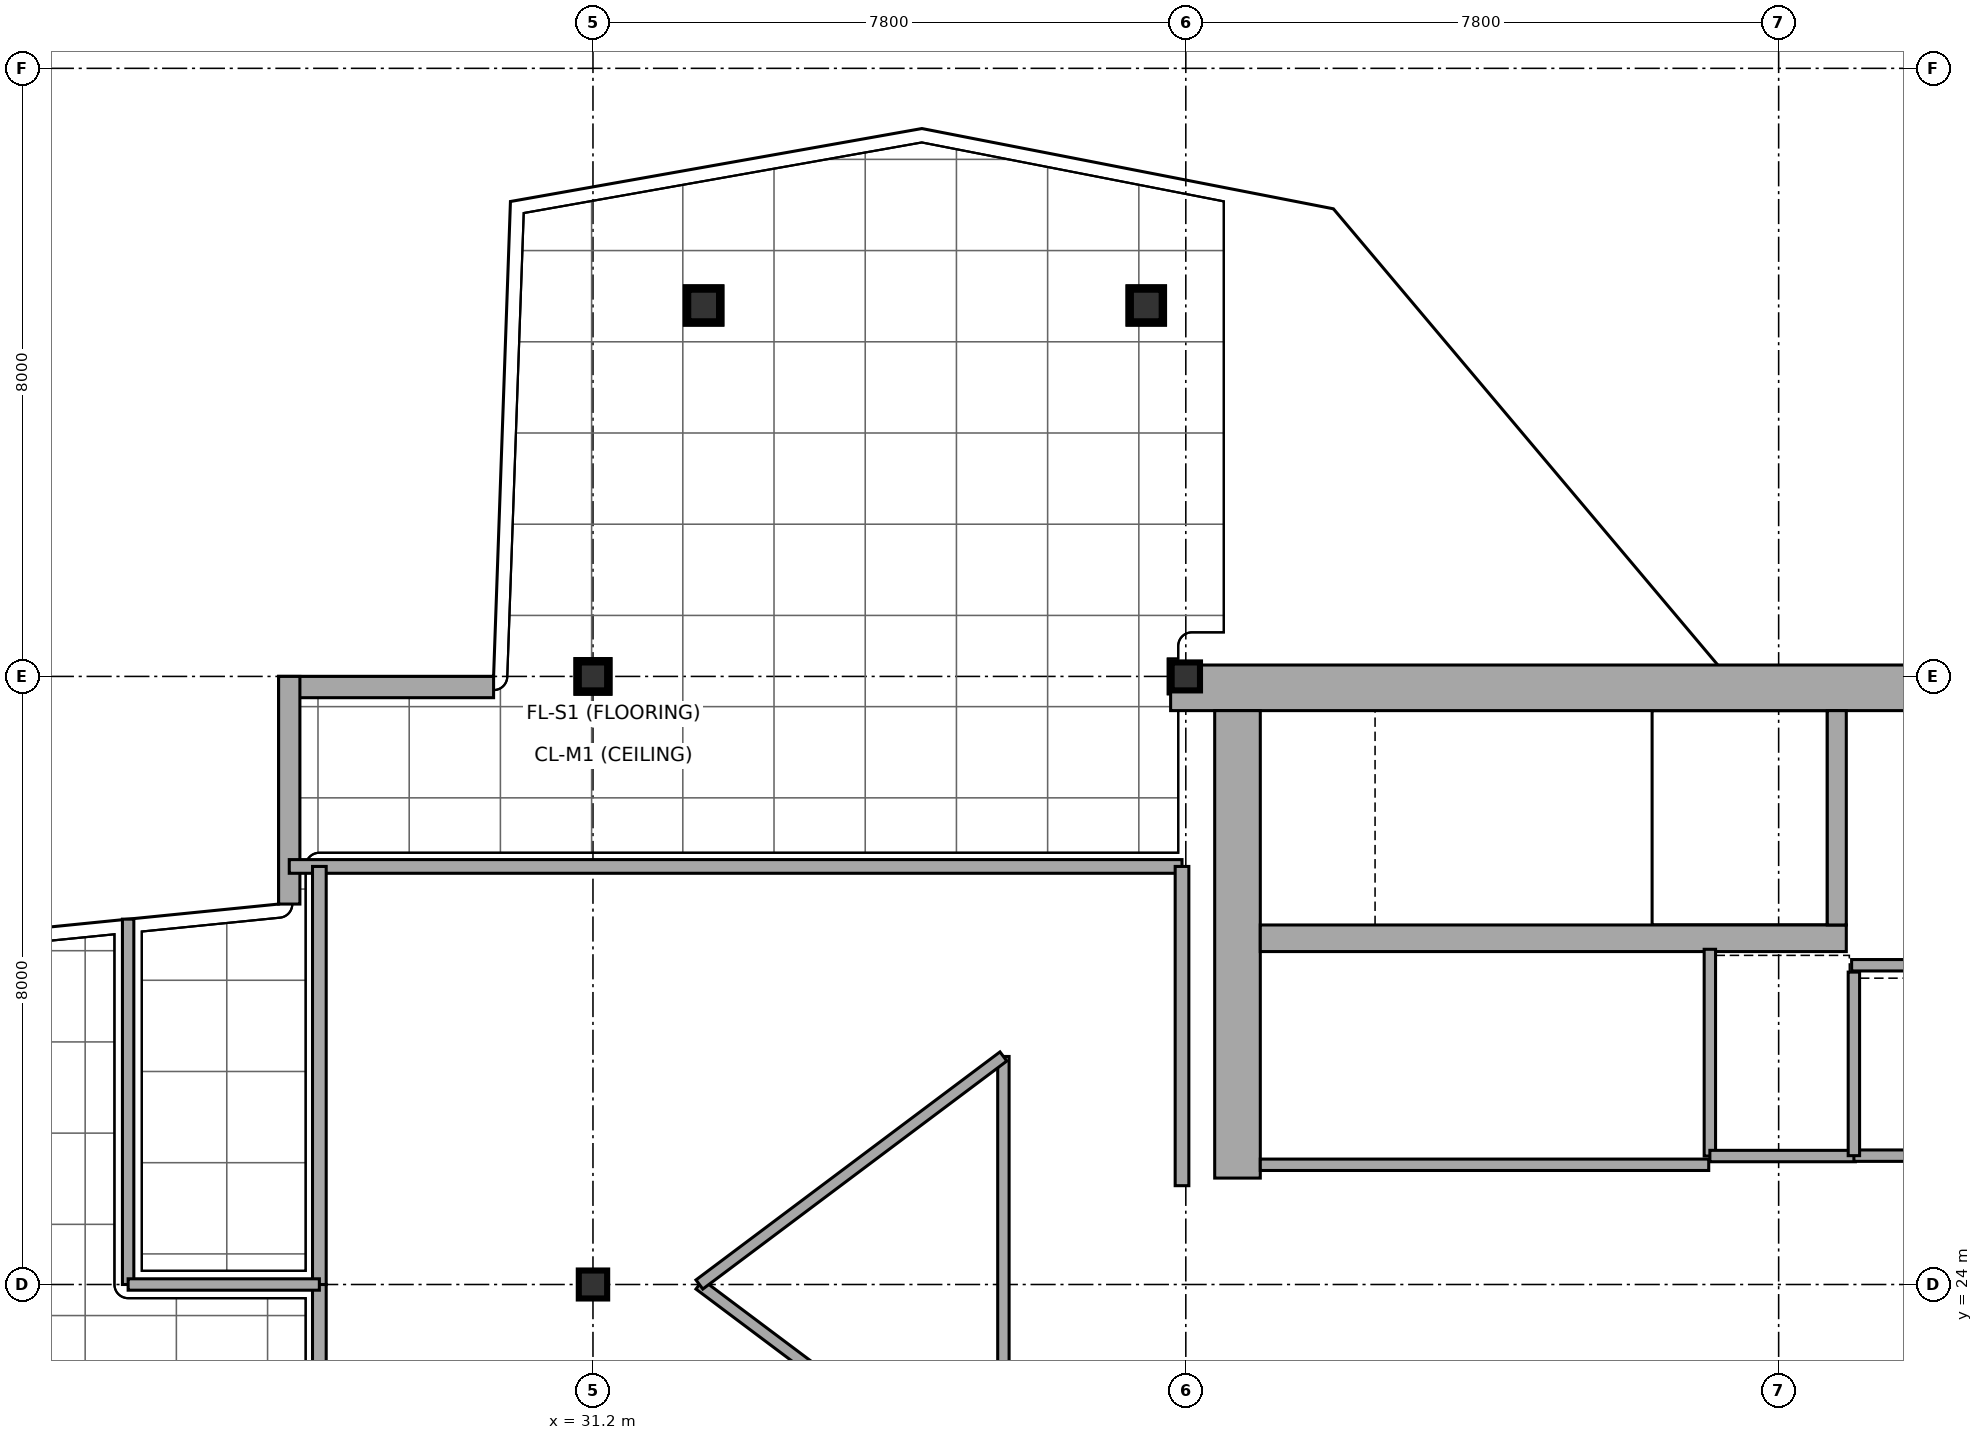
"""IFC4 building model, lengths in metres.
Left out: names, types, materials, properties, quantities, classifications, styles, units other than length and angle.
Written with IfcOpenShell. Run it as: python <this file> out.ifc"""

import sys

from ifc_helpers import new_model, si_unit, direction, frame, frame_2d, origin, origin_2d, place, context, subcontext, project, spatial, rectangle, i_section, extrude, element, fill, save


model = new_model("IFC4")
c1 = context("Model", 3, precision=1e-05, world=origin(), true_north=direction((0.0, 1.0)))
c2 = subcontext(c1, "Body", "Model", "MODEL_VIEW")
j1 = project(units=[si_unit("LENGTHUNIT", "METRE"), si_unit("PLANEANGLEUNIT", "RADIAN")], contexts=[c1])
p1 = place(None, origin())
s1 = spatial("IfcSite", under=j1, at=p1, CompositionType="ELEMENT")
p2 = place(p1, origin())
s2 = spatial("IfcBuilding", under=s1, at=p2, CompositionType="ELEMENT")
p3 = place(p2, frame((0.0, 0.0, 262.05)))
s3 = spatial("IfcBuildingStorey", under=s2, at=p3, CompositionType="ELEMENT", Elevation=262.05)
p4 = place(p3, frame((38.8, 31.85, 0.0), z_axis=(0.0, 0.0, 1.0), x_axis=(1.0, 0.0, 0.0)))
e1 = element("IfcWall", 1, at=p4, inside=s3, PredefinedType="SHEAR", context=c2, shape_type="SweptSolid", body=[
    extrude(rectangle(XDim=16.0, YDim=0.6, at=frame_2d((8.0, 0.0))), origin(), (0.0, 0.0, 1.0), 4.56),
])
p5 = place(p3, frame((39.68, 25.4, 0.0), z_axis=(0.0, 0.0, 1.0), x_axis=(0.0, 1.0, 0.0)))
e2 = element("IfcWall", 2, at=p5, inside=s3, PredefinedType="SHEAR", context=c2, shape_type="SweptSolid", body=[
    extrude(rectangle(XDim=6.15, YDim=0.6, at=frame_2d((3.075, 0.0))), origin(), (0.0, 0.0, 1.0), 4.56),
])
p6 = place(p3, frame((39.98, 28.555, 0.0), z_axis=(0.0, 0.0, 1.0), x_axis=(1.0, 0.0, 0.0)))
e3 = element("IfcWall", 3, at=p6, inside=s3, PredefinedType="SHEAR", context=c2, shape_type="SweptSolid", body=[
    extrude(rectangle(XDim=7.71, YDim=0.35, at=frame_2d((3.855, 0.0))), origin(), (0.0, 0.0, 1.0), 4.56),
])
p7 = place(p6, frame((0.25, 0.0, 0.0)))
e4 = element("IfcOpeningElement", 4, at=p7, cuts=e3, PredefinedType="OPENING", context=c2, shape_type="SweptSolid", body=[
    extrude(rectangle(XDim=1.1, YDim=2.15, at=frame_2d((0.55, 1.075))), frame((0.0, 0.185, 0.0), z_axis=(0.0, -1.0, 0.0), x_axis=(1.0, 0.0, 0.0)), (0.0, 0.0, 1.0), 0.37),
])
p8 = place(p3, frame((47.565, 28.73, 0.0), z_axis=(0.0, 0.0, 1.0), x_axis=(0.0, 1.0, 0.0)))
e5 = element("IfcWall", 5, at=p8, inside=s3, PredefinedType="SHEAR", context=c2, shape_type="SweptSolid", body=[
    extrude(rectangle(XDim=2.82, YDim=0.25, at=frame_2d((1.41, 0.0))), origin(), (0.0, 0.0, 1.0), 4.56),
])
for number, where, z_axis, x_axis in (
    (6, (31.2, 24.0, 0.0), (0.0, 0.0, 1.0), (1.0, 0.0, 0.0)),
    (7, (31.2, 32.0, 0.0), (0.0, 0.0, 1.0), (1.0, 0.0, 0.0)),
    (8, (39.0, 32.0, 0.0), (0.0, 0.0, 1.0), (1.0, 0.0, 0.0)),
):
    element("IfcColumn", number, at=place(p3, frame(where, z_axis=z_axis, x_axis=x_axis)), inside=s3, PredefinedType="COLUMN", context=c2, shape_type="SweptSolid", body=[
        extrude(i_section(OverallWidth=0.373, OverallDepth=0.368, WebThickness=0.015, FlangeThickness=0.024, at=origin_2d()), origin(), (0.0, 0.0, 1.0), 4.794),
    ])
p9 = place(p3, frame((32.656, 36.88, 0.016), z_axis=(0.010544588521, -0.022624796729, 0.999688416571), x_axis=(0.906392585431, 0.422436363345, 0.0)))
e9 = element("IfcColumn", 9, at=p9, inside=s3, PredefinedType="COLUMN", context=c2, shape_type="SweptSolid", body=[
    extrude(i_section(OverallWidth=0.406, OverallDepth=0.416, WebThickness=0.03, FlangeThickness=0.048, at=origin_2d()), origin(), (0.0, 0.0, 1.0), 4.77),
])
p10 = place(p3, frame((38.48, 36.88, 0.016), z_axis=(-0.003788045318, -0.022625892307, 0.999736825225), x_axis=(0.986273042842, -0.165122636132, 0.0)))
e10 = element("IfcColumn", 10, at=p10, inside=s3, PredefinedType="COLUMN", context=c2, shape_type="SweptSolid", body=[
    extrude(i_section(OverallWidth=0.406, OverallDepth=0.416, WebThickness=0.03, FlangeThickness=0.048, at=origin_2d()), origin(), (0.0, 0.0, 1.0), 4.769),
])
p11 = place(p3, frame((29.892, 31.86, 0.0), z_axis=(0.0, 0.0, 1.0), x_axis=(-1.0, 0.0, 0.0)))
e11 = element("IfcWall", 11, at=p11, inside=s3, PredefinedType="STANDARD", context=c2, shape_type="SweptSolid", body=[
    extrude(rectangle(XDim=2.828, YDim=0.28, at=frame_2d((1.414, 0.0))), origin(), (0.0, 0.0, 1.0), 4.56),
])
p12 = place(p3, frame((27.204, 32.0, 0.0), z_axis=(0.0, 0.0, 1.0), x_axis=(0.0, -1.0, 0.0)))
e12 = element("IfcWall", 12, at=p12, inside=s3, PredefinedType="STANDARD", context=c2, shape_type="SweptSolid", body=[
    extrude(rectangle(XDim=2.995, YDim=0.28, at=frame_2d((1.498, 0.0))), origin(), (0.0, 0.0, 1.0), 4.089),
])
p13 = place(p3, frame((39.98, 25.575, 0.0), z_axis=(0.0, 0.0, 1.0), x_axis=(1.0, 0.0, 0.0)))
e13 = element("IfcWall", 13, at=p13, inside=s3, PredefinedType="PARTITIONING", context=c2, shape_type="SweptSolid", body=[
    extrude(rectangle(XDim=5.9, YDim=0.15, at=frame_2d((2.95, 0.0))), origin(), (0.0, 0.0, 1.0), 4.56),
])
p14 = place(p13, frame((2.35, 0.0, 0.0)))
e14 = element("IfcOpeningElement", 14, at=p14, cuts=e13, PredefinedType="OPENING", context=c2, shape_type="SweptSolid", body=[
    extrude(rectangle(XDim=1.05, YDim=2.15, at=frame_2d((0.525, 1.075))), frame((0.0, 0.085, 0.0), z_axis=(0.0, -1.0, 0.0), x_axis=(1.0, 0.0, 0.0)), (0.0, 0.0, 1.0), 0.17),
])
p15 = place(p3, frame((45.895, 25.69, 0.0), z_axis=(0.0, 0.0, 1.0), x_axis=(0.0, 1.0, 0.0)))
e15 = element("IfcWall", 15, at=p15, inside=s3, PredefinedType="PARTITIONING", context=c2, shape_type="SweptSolid", body=[
    extrude(rectangle(XDim=2.72, YDim=0.15, at=frame_2d((1.36, 0.0))), origin(), (0.0, 0.0, 1.0), 4.56),
])
p16 = place(p15, frame((0.81, 0.0, 0.0)))
e16 = element("IfcOpeningElement", 16, at=p16, cuts=e15, PredefinedType="OPENING", context=c2, shape_type="SweptSolid", body=[
    extrude(rectangle(XDim=1.1, YDim=2.15, at=frame_2d((0.55, 1.075))), frame((0.0, 0.085, 0.0), z_axis=(0.0, -1.0, 0.0), x_axis=(1.0, 0.0, 0.0)), (0.0, 0.0, 1.0), 0.17),
])
p17 = place(p3, frame((45.895, 25.69, 0.0), z_axis=(0.0, 0.0, 1.0), x_axis=(1.0, 0.0, 0.0)))
e17 = element("IfcWall", 17, at=p17, inside=s3, PredefinedType="PARTITIONING", context=c2, shape_type="SweptSolid", body=[
    extrude(rectangle(XDim=1.915, YDim=0.15, at=frame_2d((0.958, 0.0))), origin(), (0.0, 0.0, 1.0), 4.56),
])
p18 = place(p3, frame((47.79, 25.695, 0.0), z_axis=(0.0, 0.0, 1.0), x_axis=(1.0, 0.0, 0.0)))
e18 = element("IfcWall", 18, at=p18, inside=s3, PredefinedType="PARTITIONING", context=c2, shape_type="SweptSolid", body=[
    extrude(rectangle(XDim=1.92, YDim=0.15, at=frame_2d((0.96, 0.0))), origin(), (0.0, 0.0, 1.0), 4.56),
])
p19 = place(p18, frame((0.41, 0.0, 0.0)))
e19 = element("IfcOpeningElement", 19, at=p19, cuts=e18, PredefinedType="OPENING", context=c2, shape_type="SweptSolid", body=[
    extrude(rectangle(XDim=1.1, YDim=2.15, at=frame_2d((0.55, 1.075))), frame((0.0, 0.085, 0.0), z_axis=(0.0, -1.0, 0.0), x_axis=(1.0, 0.0, 0.0)), (0.0, 0.0, 1.0), 0.17),
])
p20 = place(p3, frame((47.79, 25.695, 0.0), z_axis=(0.0, 0.0, 1.0), x_axis=(0.0, 1.0, 0.0)))
e20 = element("IfcWall", 20, at=p20, inside=s3, PredefinedType="PARTITIONING", context=c2, shape_type="SweptSolid", body=[
    extrude(rectangle(XDim=2.415, YDim=0.15, at=frame_2d((1.208, 0.0))), origin(), (0.0, 0.0, 1.0), 4.56),
])
p21 = place(p3, frame((47.76, 28.2, 0.0), z_axis=(0.0, 0.0, 1.0), x_axis=(1.0, 0.0, 0.0)))
e21 = element("IfcWall", 21, at=p21, inside=s3, PredefinedType="PARTITIONING", context=c2, shape_type="SweptSolid", body=[
    extrude(rectangle(XDim=2.04, YDim=0.15, at=frame_2d((1.02, 0.0))), origin(), (0.0, 0.0, 1.0), 4.56),
])
p22 = place(p3, frame((27.204, 29.5, 0.0), z_axis=(0.0, 0.0, 1.0), x_axis=(1.0, 0.0, 0.0)))
e22 = element("IfcWall", 22, at=p22, inside=s3, PredefinedType="SOLIDWALL", context=c2, shape_type="SweptSolid", body=[
    extrude(rectangle(XDim=11.746, YDim=0.18, at=frame_2d((5.873, 0.0))), origin(), (0.0, 0.0, 1.0), 4.02),
])
p23 = place(p22, frame((5.373, 0.0, 0.0)))
e23 = element("IfcOpeningElement", 23, at=p23, cuts=e22, PredefinedType="OPENING", context=c2, shape_type="SweptSolid", body=[
    extrude(rectangle(XDim=1.0, YDim=2.15, at=frame_2d((0.5, 1.075))), frame((0.0, 0.1, 0.0), z_axis=(0.0, -1.0, 0.0), x_axis=(1.0, 0.0, 0.0)), (0.0, 0.0, 1.0), 0.2),
])
for number, where, z_axis, x_axis in (
    (24, (27.6, 18.5, 0.0), (0.0, 0.0, 1.0), (0.0, 1.0, 0.0)),
    (25, (27.6, 24.0, 0.0), (0.0, 0.0, 1.0), (0.0, 1.0, 0.0)),
):
    element("IfcWall", number, at=place(p3, frame(where, z_axis=z_axis, x_axis=x_axis)), inside=s3, PredefinedType="SOLIDWALL", context=c2, shape_type="SweptSolid", body=[
        extrude(rectangle(XDim=5.5, YDim=0.18, at=frame_2d((2.75, 0.0))), origin(), (0.0, 0.0, 1.0), 4.02),
    ])
p24 = place(p3, frame((38.95, 25.3, 0.0), z_axis=(0.0, 0.0, 1.0), x_axis=(0.0, 1.0, 0.0)))
e26 = element("IfcWall", 26, at=p24, inside=s3, PredefinedType="SOLIDWALL", context=c2, shape_type="SweptSolid", body=[
    extrude(rectangle(XDim=4.2, YDim=0.18, at=frame_2d((2.1, 0.0))), origin(), (0.0, 0.0, 1.0), 4.29),
])
p25 = place(p3, frame((25.084, 24.0, 0.0), z_axis=(0.0, 0.0, 1.0), x_axis=(0.0, 1.0, 0.0)))
e27 = element("IfcWall", 27, at=p25, inside=s3, PredefinedType="MOVABLE", context=c2, shape_type="SweptSolid", body=[
    extrude(rectangle(XDim=4.807, YDim=0.15, at=frame_2d((2.403, 0.0))), origin(), (0.0, 0.0, 1.0), 4.02),
])
p26 = place(p3, frame((25.084, 24.0, 0.0), z_axis=(0.0, 0.0, 1.0), x_axis=(1.0, 0.0, 0.0)))
e28 = element("IfcWall", 28, at=p26, inside=s3, PredefinedType="MOVABLE", context=c2, shape_type="SweptSolid", body=[
    extrude(rectangle(XDim=2.516, YDim=0.15, at=frame_2d((1.258, 0.0))), origin(), (0.0, 0.0, 1.0), 4.29),
])
p27 = place(p3, frame((32.6, 24.0, 0.0), z_axis=(0.0, 0.0, 1.0), x_axis=(0.8, -0.6, 0.0)))
e29 = element("IfcWall", 29, at=p27, inside=s3, PredefinedType="MOVABLE", context=c2, shape_type="SweptSolid", body=[
    extrude(rectangle(XDim=5.0, YDim=0.15, at=frame_2d((2.5, 0.0))), origin(), (0.0, 0.0, 1.0), 4.56),
])
p28 = place(p3, frame((36.6, 21.0, 0.0), z_axis=(0.0, 0.0, 1.0), x_axis=(0.0, 1.0, 0.0)))
e30 = element("IfcWall", 30, at=p28, inside=s3, PredefinedType="MOVABLE", context=c2, shape_type="SweptSolid", body=[
    extrude(rectangle(XDim=6.0, YDim=0.15, at=frame_2d((3.0, 0.0))), origin(), (0.0, 0.0, 1.0), 4.56),
])
p29 = place(p3, frame((36.6, 27.0, 0.0), z_axis=(0.0, 0.0, 1.0), x_axis=(-0.8, -0.6, 0.0)))
e31 = element("IfcWall", 31, at=p29, inside=s3, PredefinedType="MOVABLE", context=c2, shape_type="SweptSolid", body=[
    extrude(rectangle(XDim=5.0, YDim=0.15, at=frame_2d((2.5, 0.0))), origin(), (0.0, 0.0, 1.0), 4.56),
])
p30 = place(p14, origin())
e32 = element("IfcDoor", 32, at=p30, inside=s3, OperationType="SINGLE_SWING_LEFT", PredefinedType="DOOR", context=c2, shape_type="SweptSolid", body=[
    extrude(rectangle(XDim=1.05, YDim=2.15, at=frame_2d((0.525, 1.075))), frame((0.0, 0.025, 0.0), z_axis=(0.0, -1.0, 0.0), x_axis=(1.0, 0.0, 0.0)), (0.0, 0.0, 1.0), 0.05),
])
fill(e14, e32)
p31 = place(p16, frame((1.1, 0.0, 0.0), z_axis=(0.0, 0.0, 1.0), x_axis=(-1.0, 0.0, 0.0)))
e33 = element("IfcDoor", 33, at=p31, inside=s3, OperationType="DOUBLE_DOOR_SLIDING", PredefinedType="DOOR", context=c2, shape_type="SweptSolid", body=[
    extrude(rectangle(XDim=1.1, YDim=2.15, at=frame_2d((0.55, 1.075))), frame((0.0, 0.025, 0.0), z_axis=(0.0, -1.0, 0.0), x_axis=(1.0, 0.0, 0.0)), (0.0, 0.0, 1.0), 0.05),
])
fill(e16, e33)
p32 = place(p19, frame((1.1, 0.0, 0.0), z_axis=(0.0, 0.0, 1.0), x_axis=(-1.0, 0.0, 0.0)))
e34 = element("IfcDoor", 34, at=p32, inside=s3, OperationType="DOUBLE_DOOR_SLIDING", PredefinedType="DOOR", context=c2, shape_type="SweptSolid", body=[
    extrude(rectangle(XDim=1.1, YDim=2.15, at=frame_2d((0.55, 1.075))), frame((0.0, 0.025, 0.0), z_axis=(0.0, -1.0, 0.0), x_axis=(1.0, 0.0, 0.0)), (0.0, 0.0, 1.0), 0.05),
])
fill(e19, e34)
p33 = place(p23, origin())
e35 = element("IfcDoor", 35, at=p33, inside=s3, OperationType="SINGLE_SWING_LEFT", PredefinedType="DOOR", context=c2, shape_type="SweptSolid", body=[
    extrude(rectangle(XDim=1.0, YDim=2.15, at=frame_2d((0.5, 1.075))), frame((0.0, 0.025, 0.0), z_axis=(0.0, -1.0, 0.0), x_axis=(1.0, 0.0, 0.0)), (0.0, 0.0, 1.0), 0.05),
])
fill(e23, e35)
p34 = place(p7, origin())
e36 = element("IfcDoor", 36, at=p34, inside=s3, OperationType="SINGLE_SWING_RIGHT", PredefinedType="DOOR", context=c2, shape_type="SweptSolid", body=[
    extrude(rectangle(XDim=1.1, YDim=2.15, at=frame_2d((0.55, 1.075))), frame((0.0, 0.025, 0.0), z_axis=(0.0, -1.0, 0.0), x_axis=(1.0, 0.0, 0.0)), (0.0, 0.0, 1.0), 0.05),
])
fill(e4, e36)
save(model, sys.argv[1])
